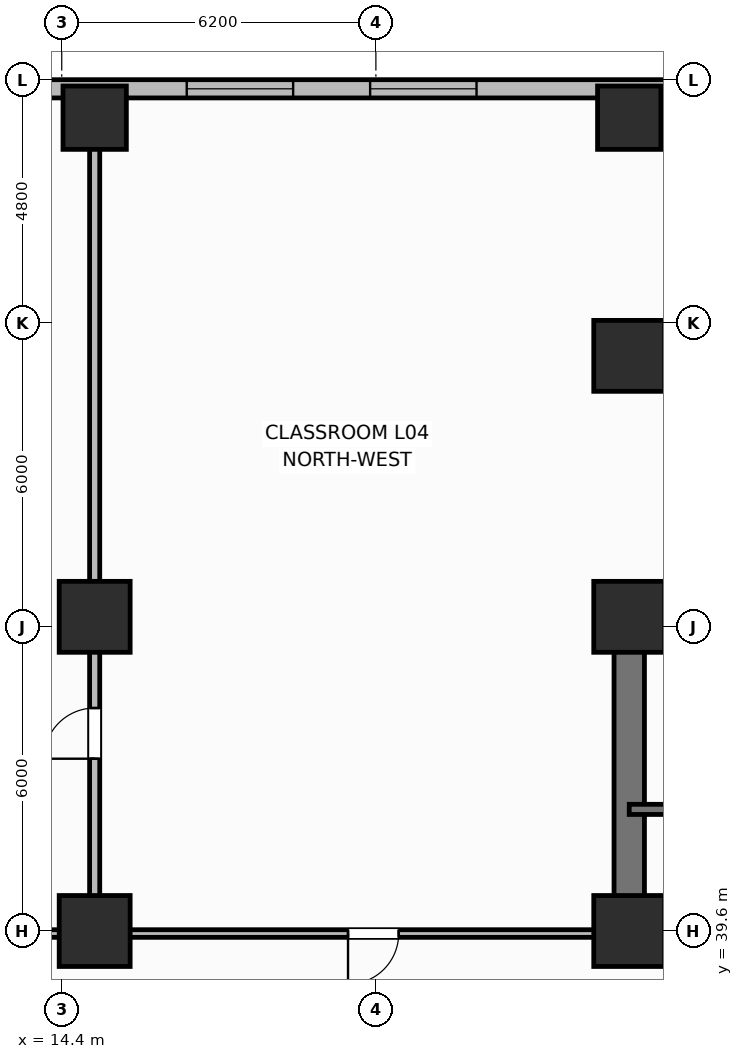
"""IFC4 building model, lengths in metres.
Left out: names, types, materials, properties, quantities, classifications, styles, units other than length and angle.
Written with IfcOpenShell. Run it as: python <this file> out.ifc"""

import sys

from ifc_helpers import new_model, si_unit, direction, frame, frame_2d, origin, origin_2d, place, context, subcontext, project, spatial, rectangle, extrude, element, fill, save


model = new_model("IFC4")
c1 = context("Model", 3, precision=1e-05, world=origin(), true_north=direction((0.0, 1.0)))
c2 = subcontext(c1, "Body", "Model", "MODEL_VIEW")
j1 = project(units=[si_unit("LENGTHUNIT", "METRE"), si_unit("PLANEANGLEUNIT", "RADIAN")], contexts=[c1])
p1 = place(None, origin())
s1 = spatial("IfcSite", under=j1, at=p1, CompositionType="ELEMENT")
p2 = place(p1, origin())
s2 = spatial("IfcBuilding", under=s1, at=p2, CompositionType="ELEMENT")
p3 = place(p2, frame((0.0, 0.0, 20.1)))
s3 = spatial("IfcBuildingStorey", under=s2, at=p3, CompositionType="ELEMENT", Elevation=20.1)
p4 = place(p3, frame((25.6, 45.8, 0.0), z_axis=(0.0, 0.0, 1.0), x_axis=(1.0, 0.0, 0.0)))
e1 = element("IfcWall", 1, at=p4, inside=s3, PredefinedType="SHEAR", context=c2, shape_type="SweptSolid", body=[
    extrude(rectangle(XDim=27.2, YDim=0.6, at=frame_2d((13.6, 0.0))), origin(), (0.0, 0.0, 1.0), 4.5),
])
p5 = place(p3, frame((25.6, 39.9, 0.0), z_axis=(0.0, 0.0, 1.0), x_axis=(0.0, 1.0, 0.0)))
e2 = element("IfcWall", 2, at=p5, inside=s3, PredefinedType="SHEAR", context=c2, shape_type="SweptSolid", body=[
    extrude(rectangle(XDim=5.6, YDim=0.6, at=frame_2d((2.8, 0.0))), origin(), (0.0, 0.0, 1.0), 4.5),
])
p6 = place(p3, frame((52.8, 39.6, 0.0), z_axis=(0.0, 0.0, 1.0), x_axis=(-1.0, 0.0, 0.0)))
e3 = element("IfcWall", 3, at=p6, inside=s3, PredefinedType="SHEAR", context=c2, shape_type="SweptSolid", body=[
    extrude(rectangle(XDim=27.2, YDim=0.6, at=frame_2d((13.6, 0.0))), origin(), (0.0, 0.0, 1.0), 4.5),
])
p7 = place(p6, frame((24.2, 0.0, 0.0)))
e4 = element("IfcOpeningElement", 4, at=p7, cuts=e3, PredefinedType="OPENING", context=c2, shape_type="SweptSolid", body=[
    extrude(rectangle(XDim=1.1, YDim=2.15, at=frame_2d((0.55, 1.075))), frame((0.0, 0.31, 0.0), z_axis=(0.0, -1.0, 0.0), x_axis=(1.0, 0.0, 0.0)), (0.0, 0.0, 1.0), 0.62),
])
p8 = place(p6, frame((20.55, 0.0, 0.0)))
e5 = element("IfcOpeningElement", 5, at=p8, cuts=e3, PredefinedType="OPENING", context=c2, shape_type="SweptSolid", body=[
    extrude(rectangle(XDim=0.95, YDim=2.1, at=frame_2d((0.475, 1.05))), frame((0.0, 0.31, 0.0), z_axis=(0.0, -1.0, 0.0), x_axis=(1.0, 0.0, 0.0)), (0.0, 0.0, 1.0), 0.62),
])
p9 = place(p6, frame((15.1, 0.0, 0.0)))
e6 = element("IfcOpeningElement", 6, at=p9, cuts=e3, PredefinedType="OPENING", context=c2, shape_type="SweptSolid", body=[
    extrude(rectangle(XDim=1.2, YDim=2.15, at=frame_2d((0.6, 1.075))), frame((0.0, 0.31, 0.0), z_axis=(0.0, -1.0, 0.0), x_axis=(1.0, 0.0, 0.0)), (0.0, 0.0, 1.0), 0.62),
])
p10 = place(p6, frame((11.6, 0.0, 0.0)))
e7 = element("IfcOpeningElement", 7, at=p10, cuts=e3, PredefinedType="OPENING", context=c2, shape_type="SweptSolid", body=[
    extrude(rectangle(XDim=0.9, YDim=2.1, at=frame_2d((0.45, 1.05))), frame((0.0, 0.31, 0.0), z_axis=(0.0, -1.0, 0.0), x_axis=(1.0, 0.0, 0.0)), (0.0, 0.0, 1.0), 0.62),
])
p11 = place(p6, frame((4.8, 0.0, 0.0)))
e8 = element("IfcOpeningElement", 8, at=p11, cuts=e3, PredefinedType="OPENING", context=c2, shape_type="SweptSolid", body=[
    extrude(rectangle(XDim=0.85, YDim=2.1, at=frame_2d((0.425, 1.05))), frame((0.0, 0.31, 0.0), z_axis=(0.0, -1.0, 0.0), x_axis=(1.0, 0.0, 0.0)), (0.0, 0.0, 1.0), 0.62),
])
p12 = place(p6, frame((1.9, 0.0, 0.0)))
e9 = element("IfcOpeningElement", 9, at=p12, cuts=e3, PredefinedType="OPENING", context=c2, shape_type="SweptSolid", body=[
    extrude(rectangle(XDim=0.85, YDim=2.1, at=frame_2d((0.425, 1.05))), frame((0.0, 0.31, 0.0), z_axis=(0.0, -1.0, 0.0), x_axis=(1.0, 0.0, 0.0)), (0.0, 0.0, 1.0), 0.62),
])
for number, where, z_axis, x_axis in (
    (10, (25.6, 39.6, 0.0), (0.0, 0.0, 1.0), (1.0, 0.0, 0.0)),
    (11, (25.6, 45.8, 0.0), (0.0, 0.0, 1.0), (1.0, 0.0, 0.0)),
):
    element("IfcColumn", number, at=place(p3, frame(where, z_axis=z_axis, x_axis=x_axis)), inside=s3, PredefinedType="COLUMN", context=c2, shape_type="SweptSolid", body=[
        extrude(rectangle(XDim=1.4, YDim=1.4, at=origin_2d()), origin(), (0.0, 0.0, 1.0), 4.5),
    ])
for number, where, z_axis, x_axis in (
    (12, (15.05, 55.65, 0.0), (0.0, 0.0, 1.0), (1.0, 0.0, 0.0)),
    (13, (25.6, 55.65, 0.0), (0.0, 0.0, 1.0), (1.0, 0.0, 0.0)),
):
    element("IfcColumn", number, at=place(p3, frame(where, z_axis=z_axis, x_axis=x_axis)), inside=s3, PredefinedType="COLUMN", context=c2, shape_type="SweptSolid", body=[
        extrude(rectangle(XDim=1.25, YDim=1.25, at=origin_2d()), origin(), (0.0, 0.0, 1.0), 4.5),
    ])
for number, where, z_axis, x_axis in (
    (14, (25.6, 50.95, 0.0), (0.0, 0.0, 1.0), (1.0, 0.0, 0.0)),
    (15, (15.05, 39.6, 0.0), (0.0, 0.0, 1.0), (1.0, 0.0, 0.0)),
    (16, (15.05, 45.8, 0.0), (0.0, 0.0, 1.0), (1.0, 0.0, 0.0)),
):
    element("IfcColumn", number, at=place(p3, frame(where, z_axis=z_axis, x_axis=x_axis)), inside=s3, PredefinedType="COLUMN", context=c2, shape_type="SweptSolid", body=[
        extrude(rectangle(XDim=1.4, YDim=1.4, at=origin_2d()), origin(), (0.0, 0.0, 1.0), 4.5),
    ])
p13 = place(p3, frame((56.57, 56.22, 0.0), z_axis=(0.0, 0.0, 1.0), x_axis=(-1.0, 0.0, 0.0)))
e17 = element("IfcWall", 17, at=p13, inside=s3, PredefinedType="SOLIDWALL", context=c2, shape_type="SweptSolid", body=[
    extrude(rectangle(XDim=55.59, YDim=0.36, at=frame_2d((27.795, 0.0))), origin(), (0.0, 0.0, 1.0), 2.3),
])
p14 = place(p13, frame((5.029, 0.0, 0.3)))
e18 = element("IfcOpeningElement", 18, at=p14, cuts=e17, PredefinedType="OPENING", context=c2, shape_type="SweptSolid", body=[
    extrude(rectangle(XDim=2.1, YDim=2.2, at=frame_2d((1.05, 1.1))), frame((0.0, 0.19, 0.0), z_axis=(0.0, -1.0, 0.0), x_axis=(1.0, 0.0, 0.0)), (0.0, 0.0, 1.0), 0.38),
])
p15 = place(p13, frame((8.648, 0.0, 0.3)))
e19 = element("IfcOpeningElement", 19, at=p15, cuts=e17, PredefinedType="OPENING", context=c2, shape_type="SweptSolid", body=[
    extrude(rectangle(XDim=2.1, YDim=2.2, at=frame_2d((1.05, 1.1))), frame((0.0, 0.19, 0.0), z_axis=(0.0, -1.0, 0.0), x_axis=(1.0, 0.0, 0.0)), (0.0, 0.0, 1.0), 0.38),
])
p16 = place(p13, frame((12.268, 0.0, 0.3)))
e20 = element("IfcOpeningElement", 20, at=p16, cuts=e17, PredefinedType="OPENING", context=c2, shape_type="SweptSolid", body=[
    extrude(rectangle(XDim=2.1, YDim=2.2, at=frame_2d((1.05, 1.1))), frame((0.0, 0.19, 0.0), z_axis=(0.0, -1.0, 0.0), x_axis=(1.0, 0.0, 0.0)), (0.0, 0.0, 1.0), 0.38),
])
p17 = place(p13, frame((19.506, 0.0, 0.3)))
e21 = element("IfcOpeningElement", 21, at=p17, cuts=e17, PredefinedType="OPENING", context=c2, shape_type="SweptSolid", body=[
    extrude(rectangle(XDim=2.1, YDim=2.2, at=frame_2d((1.05, 1.1))), frame((0.0, 0.19, 0.0), z_axis=(0.0, -1.0, 0.0), x_axis=(1.0, 0.0, 0.0)), (0.0, 0.0, 1.0), 0.38),
])
p18 = place(p13, frame((23.126, 0.0, 0.3)))
e22 = element("IfcOpeningElement", 22, at=p18, cuts=e17, PredefinedType="OPENING", context=c2, shape_type="SweptSolid", body=[
    extrude(rectangle(XDim=2.1, YDim=2.2, at=frame_2d((1.05, 1.1))), frame((0.0, 0.19, 0.0), z_axis=(0.0, -1.0, 0.0), x_axis=(1.0, 0.0, 0.0)), (0.0, 0.0, 1.0), 0.38),
])
p19 = place(p13, frame((26.745, 0.0, 0.3)))
e23 = element("IfcOpeningElement", 23, at=p19, cuts=e17, PredefinedType="OPENING", context=c2, shape_type="SweptSolid", body=[
    extrude(rectangle(XDim=2.1, YDim=2.2, at=frame_2d((1.05, 1.1))), frame((0.0, 0.19, 0.0), z_axis=(0.0, -1.0, 0.0), x_axis=(1.0, 0.0, 0.0)), (0.0, 0.0, 1.0), 0.38),
])
p20 = place(p13, frame((33.984, 0.0, 0.3)))
e24 = element("IfcOpeningElement", 24, at=p20, cuts=e17, PredefinedType="OPENING", context=c2, shape_type="SweptSolid", body=[
    extrude(rectangle(XDim=2.1, YDim=2.2, at=frame_2d((1.05, 1.1))), frame((0.0, 0.19, 0.0), z_axis=(0.0, -1.0, 0.0), x_axis=(1.0, 0.0, 0.0)), (0.0, 0.0, 1.0), 0.38),
])
p21 = place(p13, frame((37.603, 0.0, 0.3)))
e25 = element("IfcOpeningElement", 25, at=p21, cuts=e17, PredefinedType="OPENING", context=c2, shape_type="SweptSolid", body=[
    extrude(rectangle(XDim=2.1, YDim=2.2, at=frame_2d((1.05, 1.1))), frame((0.0, 0.19, 0.0), z_axis=(0.0, -1.0, 0.0), x_axis=(1.0, 0.0, 0.0)), (0.0, 0.0, 1.0), 0.38),
])
p22 = place(p13, frame((44.842, 0.0, 0.3)))
e26 = element("IfcOpeningElement", 26, at=p22, cuts=e17, PredefinedType="OPENING", context=c2, shape_type="SweptSolid", body=[
    extrude(rectangle(XDim=2.1, YDim=2.2, at=frame_2d((1.05, 1.1))), frame((0.0, 0.19, 0.0), z_axis=(0.0, -1.0, 0.0), x_axis=(1.0, 0.0, 0.0)), (0.0, 0.0, 1.0), 0.38),
])
p23 = place(p13, frame((52.08, 0.0, 0.3)))
e27 = element("IfcOpeningElement", 27, at=p23, cuts=e17, PredefinedType="OPENING", context=c2, shape_type="SweptSolid", body=[
    extrude(rectangle(XDim=2.1, YDim=2.2, at=frame_2d((1.05, 1.1))), frame((0.0, 0.19, 0.0), z_axis=(0.0, -1.0, 0.0), x_axis=(1.0, 0.0, 0.0)), (0.0, 0.0, 1.0), 0.38),
])
p24 = place(p3, frame((35.15, 42.0, 0.0), z_axis=(0.0, 0.0, 1.0), x_axis=(-1.0, 0.0, 0.0)))
e28 = element("IfcWall", 28, at=p24, inside=s3, PredefinedType="SHEAR", context=c2, shape_type="SweptSolid", body=[
    extrude(rectangle(XDim=9.55, YDim=0.2, at=frame_2d((4.775, 0.0))), origin(), (0.0, 0.0, 1.0), 4.5),
])
p25 = place(p24, frame((7.25, 0.0, 0.0)))
e29 = element("IfcOpeningElement", 29, at=p25, cuts=e28, PredefinedType="OPENING", context=c2, shape_type="SweptSolid", body=[
    extrude(rectangle(XDim=1.1, YDim=2.15, at=frame_2d((0.55, 1.075))), frame((0.0, 0.11, 0.0), z_axis=(0.0, -1.0, 0.0), x_axis=(1.0, 0.0, 0.0)), (0.0, 0.0, 1.0), 0.22),
])
p26 = place(p3, frame((15.05, 39.6, 0.0), z_axis=(0.0, 0.0, 1.0), x_axis=(0.0, 1.0, 0.0)))
e30 = element("IfcWall", 30, at=p26, inside=s3, PredefinedType="PARTITIONING", context=c2, shape_type="SweptSolid", body=[
    extrude(rectangle(XDim=16.4, YDim=0.2, at=frame_2d((8.2, 0.0))), origin(), (0.0, 0.0, 1.0), 2.26),
])
p27 = place(p26, frame((3.4, 0.0, 0.0)))
e31 = element("IfcOpeningElement", 31, at=p27, cuts=e30, PredefinedType="OPENING", context=c2, shape_type="SweptSolid", body=[
    extrude(rectangle(XDim=1.0, YDim=2.15, at=frame_2d((0.5, 1.075))), frame((0.0, 0.11, 0.0), z_axis=(0.0, -1.0, 0.0), x_axis=(1.0, 0.0, 0.0)), (0.0, 0.0, 1.0), 0.22),
])
p28 = place(p3, frame((25.25, 39.55, 0.0), z_axis=(0.0, 0.0, 1.0), x_axis=(-1.0, 0.0, 0.0)))
e32 = element("IfcWall", 32, at=p28, inside=s3, PredefinedType="PARTITIONING", context=c2, shape_type="SweptSolid", body=[
    extrude(rectangle(XDim=13.25, YDim=0.15, at=frame_2d((6.625, 0.0))), origin(), (0.0, 0.0, 1.0), 2.26),
])
p29 = place(p28, frame((4.2, 0.0, 0.0)))
e33 = element("IfcOpeningElement", 33, at=p29, cuts=e32, PredefinedType="OPENING", context=c2, shape_type="SweptSolid", body=[
    extrude(rectangle(XDim=1.0, YDim=2.15, at=frame_2d((0.5, 1.075))), frame((0.0, 0.085, 0.0), z_axis=(0.0, -1.0, 0.0), x_axis=(1.0, 0.0, 0.0)), (0.0, 0.0, 1.0), 0.17),
])
p30 = place(p20, origin())
e34 = element("IfcWindow", 34, at=p30, inside=s3, PartitioningType="SINGLE_PANEL", PredefinedType="WINDOW", context=c2, shape_type="SweptSolid", body=[
    extrude(rectangle(XDim=2.1, YDim=2.2, at=frame_2d((1.05, 1.1))), frame((0.0, 0.03, 0.0), z_axis=(0.0, -1.0, 0.0), x_axis=(1.0, 0.0, 0.0)), (0.0, 0.0, 1.0), 0.06),
])
fill(e24, e34)
p31 = place(p21, origin())
e35 = element("IfcWindow", 35, at=p31, inside=s3, PartitioningType="SINGLE_PANEL", PredefinedType="WINDOW", context=c2, shape_type="SweptSolid", body=[
    extrude(rectangle(XDim=2.1, YDim=2.2, at=frame_2d((1.05, 1.1))), frame((0.0, 0.03, 0.0), z_axis=(0.0, -1.0, 0.0), x_axis=(1.0, 0.0, 0.0)), (0.0, 0.0, 1.0), 0.06),
])
fill(e25, e35)
p32 = place(p27, origin())
e36 = element("IfcDoor", 36, at=p32, inside=s3, OperationType="SINGLE_SWING_LEFT", PredefinedType="DOOR", context=c2, shape_type="SweptSolid", body=[
    extrude(rectangle(XDim=1.0, YDim=2.15, at=frame_2d((0.5, 1.075))), frame((0.0, 0.025, 0.0), z_axis=(0.0, -1.0, 0.0), x_axis=(1.0, 0.0, 0.0)), (0.0, 0.0, 1.0), 0.05),
])
fill(e31, e36)
p33 = place(p29, origin())
e37 = element("IfcDoor", 37, at=p33, inside=s3, OperationType="SINGLE_SWING_RIGHT", PredefinedType="DOOR", context=c2, shape_type="SweptSolid", body=[
    extrude(rectangle(XDim=1.0, YDim=2.15, at=frame_2d((0.5, 1.075))), frame((0.0, 0.025, 0.0), z_axis=(0.0, -1.0, 0.0), x_axis=(1.0, 0.0, 0.0)), (0.0, 0.0, 1.0), 0.05),
])
fill(e33, e37)
save(model, sys.argv[1])
